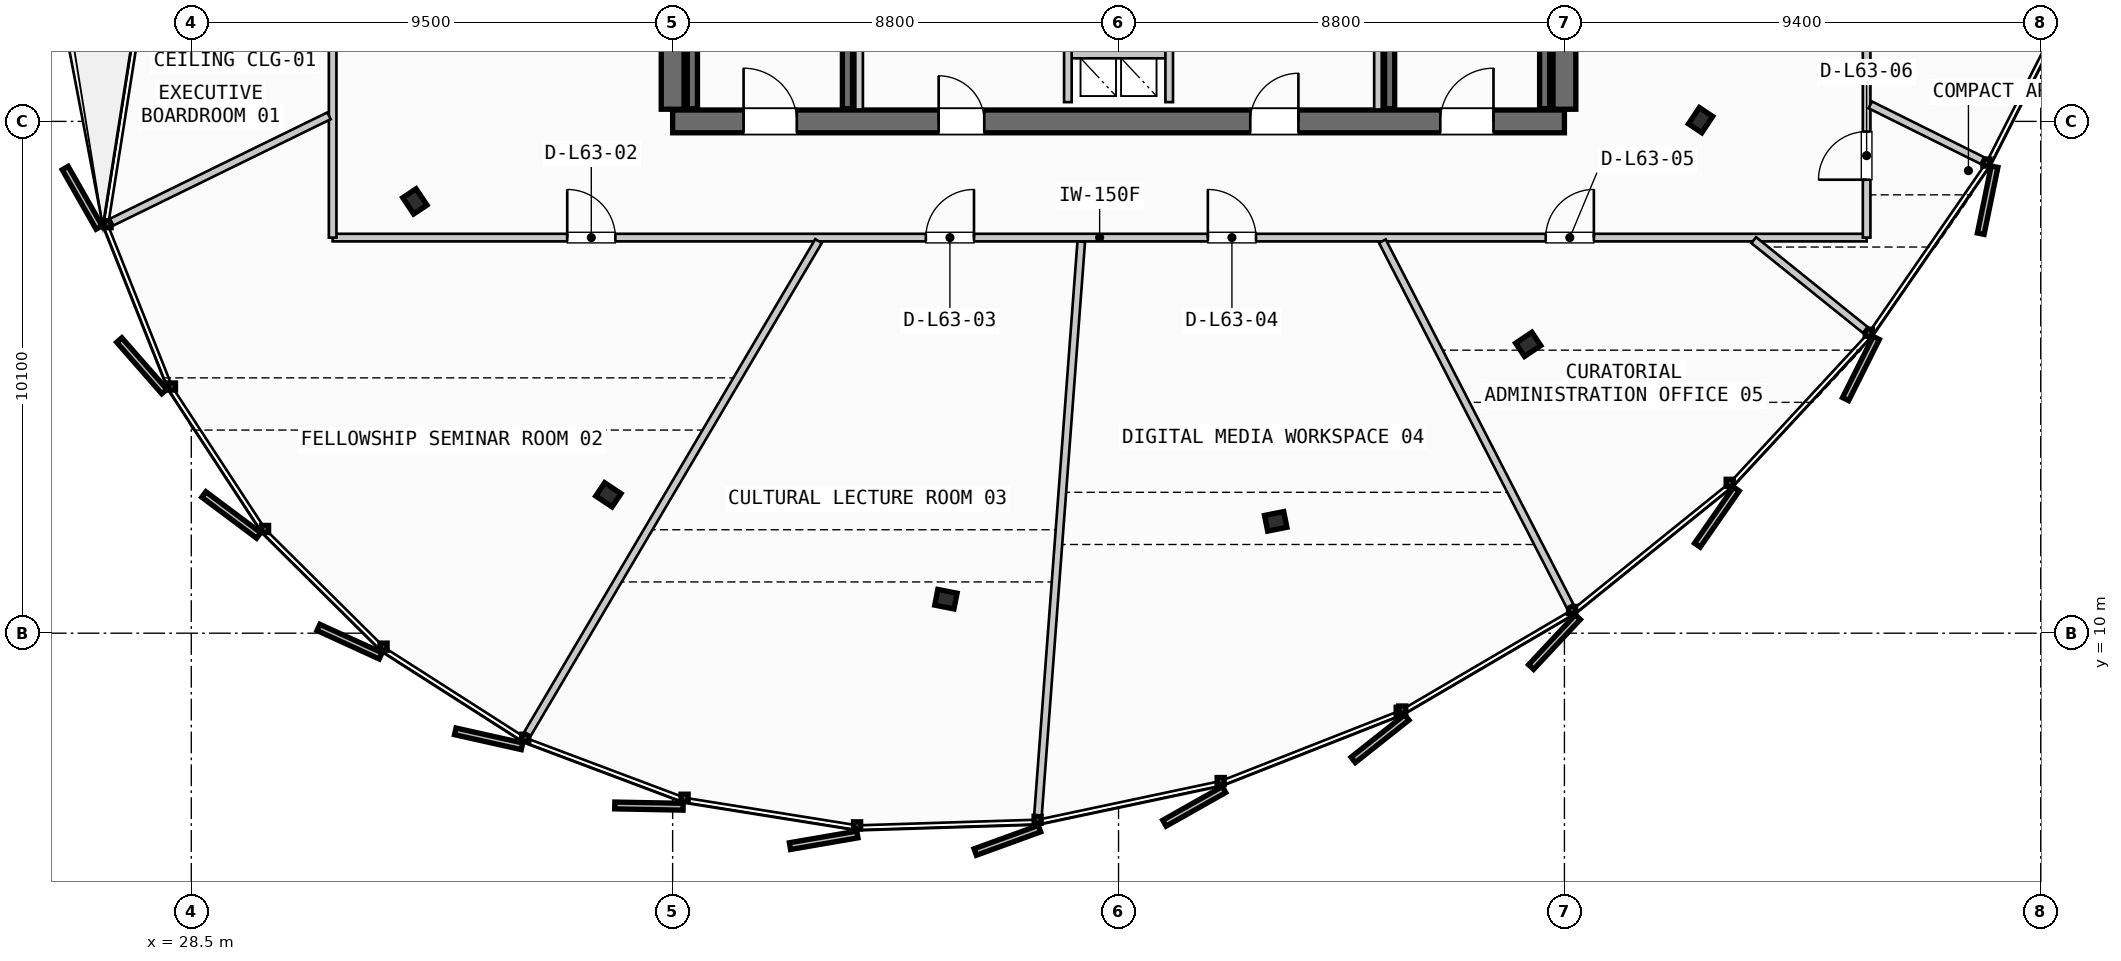
"""IFC4 building model, lengths in metres.
Left out: names, types, materials, properties, quantities, classifications, styles, units other than length and angle.
Written with IfcOpenShell. Run it as: python <this file> out.ifc"""

import sys

from ifc_helpers import new_model, si_unit, direction, frame, frame_2d, origin, origin_2d, place, context, subcontext, project, spatial, rectangle, i_section, extrude, source, transform, mapped, element, fill, save


model = new_model("IFC4")
c1 = context("Model", 3, precision=1e-05, world=origin(), true_north=direction((0.0, 1.0)))
c2 = subcontext(c1, "Body", "Model", "MODEL_VIEW")
j1 = project(units=[si_unit("LENGTHUNIT", "METRE"), si_unit("PLANEANGLEUNIT", "RADIAN")], contexts=[c1])
p1 = place(None, origin())
s1 = spatial("IfcSite", under=j1, at=p1, CompositionType="ELEMENT")
p2 = place(p1, origin())
s2 = spatial("IfcBuilding", under=s1, at=p2, CompositionType="ELEMENT")
p3 = place(p2, frame((0.0, 0.0, 242.2)))
s3 = spatial("IfcBuildingStorey", under=s2, at=p3, CompositionType="ELEMENT", Elevation=242.2)
p4 = place(p3, frame((38.0, 20.1, 0.0), z_axis=(0.0, 0.0, 1.0), x_axis=(1.0, 0.0, 0.0)))
e1 = element("IfcWall", 1, at=p4, inside=s3, PredefinedType="SHEAR", context=c2, shape_type="SweptSolid", body=[
    extrude(rectangle(XDim=17.6, YDim=0.45, at=frame_2d((8.8, 0.0))), origin(), (0.0, 0.0, 1.0), 3.21),
])
p5 = place(p4, frame((1.4, 0.0, 0.0)))
e2 = element("IfcOpeningElement", 2, at=p5, cuts=e1, PredefinedType="OPENING", context=c2, shape_type="SweptSolid", body=[
    extrude(rectangle(XDim=1.05, YDim=2.15, at=frame_2d((0.525, 1.075))), frame((0.0, 0.235, 0.0), z_axis=(0.0, -1.0, 0.0), x_axis=(1.0, 0.0, 0.0)), (0.0, 0.0, 1.0), 0.47),
])
p6 = place(p4, frame((15.15, 0.0, 0.0)))
e3 = element("IfcOpeningElement", 3, at=p6, cuts=e1, PredefinedType="OPENING", context=c2, shape_type="SweptSolid", body=[
    extrude(rectangle(XDim=1.05, YDim=2.15, at=frame_2d((0.525, 1.075))), frame((0.0, 0.235, 0.0), z_axis=(0.0, -1.0, 0.0), x_axis=(1.0, 0.0, 0.0)), (0.0, 0.0, 1.0), 0.47),
])
p7 = place(p4, frame((5.25, 0.0, 0.0)))
e4 = element("IfcOpeningElement", 4, at=p7, cuts=e1, PredefinedType="OPENING", context=c2, shape_type="SweptSolid", body=[
    extrude(rectangle(XDim=0.9, YDim=2.15, at=frame_2d((0.45, 1.075))), frame((0.0, 0.235, 0.0), z_axis=(0.0, -1.0, 0.0), x_axis=(1.0, 0.0, 0.0)), (0.0, 0.0, 1.0), 0.47),
])
p8 = place(p4, frame((11.4, 0.0, 0.0)))
e5 = element("IfcOpeningElement", 5, at=p8, cuts=e1, PredefinedType="OPENING", context=c2, shape_type="SweptSolid", body=[
    extrude(rectangle(XDim=0.95, YDim=2.15, at=frame_2d((0.475, 1.075))), frame((0.0, 0.235, 0.0), z_axis=(0.0, -1.0, 0.0), x_axis=(1.0, 0.0, 0.0)), (0.0, 0.0, 1.0), 0.47),
])
p9 = place(p3, frame((38.0, 35.26, 0.0), z_axis=(0.0, 0.0, 1.0), x_axis=(0.0, -1.0, 0.0)))
e6 = element("IfcWall", 6, at=p9, inside=s3, PredefinedType="SHEAR", context=c2, shape_type="SweptSolid", body=[
    extrude(rectangle(XDim=14.92, YDim=0.45, at=frame_2d((7.46, 0.0))), origin(), (0.0, 0.0, 1.0), 3.21),
])
p10 = place(p9, frame((5.21, 0.0, 0.0)))
e7 = element("IfcOpeningElement", 7, at=p10, cuts=e6, PredefinedType="OPENING", context=c2, shape_type="SweptSolid", body=[
    extrude(rectangle(XDim=1.1, YDim=2.2, at=frame_2d((0.55, 1.1))), frame((0.0, 0.235, 0.0), z_axis=(0.0, -1.0, 0.0), x_axis=(1.0, 0.0, 0.0)), (0.0, 0.0, 1.0), 0.47),
])
p11 = place(p3, frame((55.6, 20.34, 0.0), z_axis=(0.0, 0.0, 1.0), x_axis=(0.0, 1.0, 0.0)))
e8 = element("IfcWall", 8, at=p11, inside=s3, PredefinedType="SHEAR", context=c2, shape_type="SweptSolid", body=[
    extrude(rectangle(XDim=14.92, YDim=0.45, at=frame_2d((7.46, 0.0))), origin(), (0.0, 0.0, 1.0), 3.21),
])
p12 = place(p11, frame((12.71, 0.0, 0.0)))
e9 = element("IfcOpeningElement", 9, at=p12, cuts=e8, PredefinedType="OPENING", context=c2, shape_type="SweptSolid", body=[
    extrude(rectangle(XDim=1.05, YDim=2.15, at=frame_2d((0.525, 1.075))), frame((0.0, 0.235, 0.0), z_axis=(0.0, -1.0, 0.0), x_axis=(1.0, 0.0, 0.0)), (0.0, 0.0, 1.0), 0.47),
])
p13 = place(p11, frame((8.61, 0.0, 0.0)))
e10 = element("IfcOpeningElement", 10, at=p13, cuts=e8, PredefinedType="OPENING", context=c2, shape_type="SweptSolid", body=[
    extrude(rectangle(XDim=1.1, YDim=2.2, at=frame_2d((0.55, 1.1))), frame((0.0, 0.235, 0.0), z_axis=(0.0, -1.0, 0.0), x_axis=(1.0, 0.0, 0.0)), (0.0, 0.0, 1.0), 0.47),
])
m1 = source(origin(), c2, "Body", "SweptSolid", [
    extrude(i_section(OverallWidth=0.387, OverallDepth=0.316, WebThickness=0.019, FlangeThickness=0.028, FilletRadius=0.015, at=origin_2d()), origin(), (0.0, 0.0, 1.0), 3.21),
])
for number, where, z_axis, x_axis in (
    (11, (32.913, 18.521, 0.0), (0.0, 0.0, 1.0), (-0.831, -0.556, 0.0)),
    (12, (36.731, 12.731, 0.0), (0.0, 0.0, 1.0), (-0.556, -0.831, 0.0)),
    (13, (43.393, 10.671, 0.0), (0.0, 0.0, 1.0), (-0.195, -0.981, 0.0)),
    (14, (49.902, 12.207, 0.0), (0.0, 0.0, 1.0), (0.195, -0.981, 0.0)),
    (15, (54.885, 15.7, 0.0), (0.0, 0.0, 1.0), (0.556, -0.831, 0.0)),
    (16, (58.287, 20.125, 0.0), (0.0, 0.0, 1.0), (0.831, -0.556, 0.0)),
):
    element("IfcColumn", number, at=place(p3, frame(where, z_axis=z_axis, x_axis=x_axis)), inside=s3, PredefinedType="COLUMN", context=c2, shape_type="MappedRepresentation", body=[
        mapped(m1, transform((0.0, 0.0, 0.0), scale=1.0)),
    ])
for number, where, z_axis, x_axis in (
    (17, (41.45, 27.7, 0.0), (0.0, 0.0, 1.0), (0.0, -1.0, 0.0)),
    (18, (38.39, 20.35, 0.0), (0.0, 0.0, 1.0), (0.0, 1.0, 0.0)),
    (19, (55.21, 27.7, 0.0), (0.0, 0.0, 1.0), (0.0, -1.0, 0.0)),
    (20, (52.15, 20.35, 0.0), (0.0, 0.0, 1.0), (0.0, 1.0, 0.0)),
):
    element("IfcWall", number, at=place(p3, frame(where, z_axis=z_axis, x_axis=x_axis)), inside=s3, PredefinedType="SHEAR", context=c2, shape_type="SweptSolid", body=[
        extrude(rectangle(XDim=7.35, YDim=0.2, at=frame_2d((3.675, 0.0))), origin(), (0.0, 0.0, 1.0), 3.21),
    ])
p14 = place(p3, frame((45.8, 21.42, 0.0), z_axis=(0.0, 0.0, 1.0), x_axis=(1.0, 0.0, 0.0)))
e21 = element("IfcWall", 21, at=p14, inside=s3, PredefinedType="PARTITIONING", context=c2, shape_type="SweptSolid", body=[
    extrude(rectangle(XDim=2.0, YDim=0.15, at=frame_2d((1.0, 0.0))), origin(), (0.0, 0.0, 1.0), 2.28),
])
for number, where, z_axis, x_axis in (
    (22, (45.8, 20.48, 0.0), (0.0, 0.0, 1.0), (0.0, 1.0, 0.0)),
    (23, (47.8, 20.48, 0.0), (0.0, 0.0, 1.0), (0.0, 1.0, 0.0)),
):
    element("IfcWall", number, at=place(p3, frame(where, z_axis=z_axis, x_axis=x_axis)), inside=s3, PredefinedType="PARTITIONING", context=c2, shape_type="SweptSolid", body=[
        extrude(rectangle(XDim=2.24, YDim=0.15, at=frame_2d((1.12, 0.0))), origin(), (0.0, 0.0, 1.0), 2.28),
    ])
for number, where, z_axis, x_axis in (
    (24, (41.68, 20.335, 0.0), (0.0, 0.0, 1.0), (0.0, 1.0, 0.0)),
    (25, (51.92, 20.335, 0.0), (0.0, 0.0, 1.0), (0.0, 1.0, 0.0)),
):
    element("IfcWall", number, at=place(p3, frame(where, z_axis=z_axis, x_axis=x_axis)), inside=s3, PredefinedType="PARTITIONING", context=c2, shape_type="SweptSolid", body=[
        extrude(rectangle(XDim=2.395, YDim=0.15, at=frame_2d((1.198, 0.0))), origin(), (0.0, 0.0, 1.0), 2.28),
    ])
p15 = place(p3, frame((31.29, 17.807, 0.0), z_axis=(0.0, 0.0, 1.0), x_axis=(1.0, 0.0, 0.0)))
e26 = element("IfcWall", 26, at=p15, inside=s3, PredefinedType="PARTITIONING", context=c2, shape_type="SweptSolid", body=[
    extrude(rectangle(XDim=30.274, YDim=0.15, at=frame_2d((15.137, 0.0))), origin(), (0.0, 0.0, 1.0), 2.28),
])
p16 = place(p15, frame((4.63, 0.0, 0.0)))
e27 = element("IfcOpeningElement", 27, at=p16, cuts=e26, PredefinedType="OPENING", context=c2, shape_type="SweptSolid", body=[
    extrude(rectangle(XDim=0.95, YDim=2.15, at=frame_2d((0.475, 1.075))), frame((0.0, 0.085, 0.0), z_axis=(0.0, -1.0, 0.0), x_axis=(1.0, 0.0, 0.0)), (0.0, 0.0, 1.0), 0.17),
])
p17 = place(p15, frame((11.707, 0.0, 0.0)))
e28 = element("IfcOpeningElement", 28, at=p17, cuts=e26, PredefinedType="OPENING", context=c2, shape_type="SweptSolid", body=[
    extrude(rectangle(XDim=0.95, YDim=2.15, at=frame_2d((0.475, 1.075))), frame((0.0, 0.085, 0.0), z_axis=(0.0, -1.0, 0.0), x_axis=(1.0, 0.0, 0.0)), (0.0, 0.0, 1.0), 0.17),
])
p18 = place(p15, frame((17.273, 0.0, 0.0)))
e29 = element("IfcOpeningElement", 29, at=p18, cuts=e26, PredefinedType="OPENING", context=c2, shape_type="SweptSolid", body=[
    extrude(rectangle(XDim=0.95, YDim=2.15, at=frame_2d((0.475, 1.075))), frame((0.0, 0.085, 0.0), z_axis=(0.0, -1.0, 0.0), x_axis=(1.0, 0.0, 0.0)), (0.0, 0.0, 1.0), 0.17),
])
p19 = place(p15, frame((23.941, 0.0, 0.0)))
e30 = element("IfcOpeningElement", 30, at=p19, cuts=e26, PredefinedType="OPENING", context=c2, shape_type="SweptSolid", body=[
    extrude(rectangle(XDim=0.95, YDim=2.15, at=frame_2d((0.475, 1.075))), frame((0.0, 0.085, 0.0), z_axis=(0.0, -1.0, 0.0), x_axis=(1.0, 0.0, 0.0)), (0.0, 0.0, 1.0), 0.17),
])
p20 = place(p3, frame((61.564, 17.807, 0.0), z_axis=(0.0, 0.0, 1.0), x_axis=(0.0, 1.0, 0.0)))
e31 = element("IfcWall", 31, at=p20, inside=s3, PredefinedType="PARTITIONING", context=c2, shape_type="SweptSolid", body=[
    extrude(rectangle(XDim=19.986, YDim=0.15, at=frame_2d((9.993, 0.0))), origin(), (0.0, 0.0, 1.0), 2.28),
])
p21 = place(p20, frame((1.142, 0.0, 0.0)))
e32 = element("IfcOpeningElement", 32, at=p21, cuts=e31, PredefinedType="OPENING", context=c2, shape_type="SweptSolid", body=[
    extrude(rectangle(XDim=0.95, YDim=2.15, at=frame_2d((0.475, 1.075))), frame((0.0, 0.085, 0.0), z_axis=(0.0, -1.0, 0.0), x_axis=(1.0, 0.0, 0.0)), (0.0, 0.0, 1.0), 0.17),
])
p22 = place(p20, frame((8.436, 0.0, 0.0)))
e33 = element("IfcOpeningElement", 33, at=p22, cuts=e31, PredefinedType="OPENING", context=c2, shape_type="SweptSolid", body=[
    extrude(rectangle(XDim=0.95, YDim=2.15, at=frame_2d((0.475, 1.075))), frame((0.0, 0.085, 0.0), z_axis=(0.0, -1.0, 0.0), x_axis=(1.0, 0.0, 0.0)), (0.0, 0.0, 1.0), 0.17),
])
p23 = place(p20, frame((16.137, 0.0, 0.0)))
e34 = element("IfcOpeningElement", 34, at=p23, cuts=e31, PredefinedType="OPENING", context=c2, shape_type="SweptSolid", body=[
    extrude(rectangle(XDim=0.95, YDim=2.15, at=frame_2d((0.475, 1.075))), frame((0.0, 0.085, 0.0), z_axis=(0.0, -1.0, 0.0), x_axis=(1.0, 0.0, 0.0)), (0.0, 0.0, 1.0), 0.17),
])
p24 = place(p3, frame((31.29, 37.793, 0.0), z_axis=(0.0, 0.0, 1.0), x_axis=(0.0, -1.0, 0.0)))
e35 = element("IfcWall", 35, at=p24, inside=s3, PredefinedType="PARTITIONING", context=c2, shape_type="SweptSolid", body=[
    extrude(rectangle(XDim=19.986, YDim=0.15, at=frame_2d((9.993, 0.0))), origin(), (0.0, 0.0, 1.0), 2.28),
])
p25 = place(p24, frame((14.349, 0.0, 0.0)))
e36 = element("IfcOpeningElement", 36, at=p25, cuts=e35, PredefinedType="OPENING", context=c2, shape_type="SweptSolid", body=[
    extrude(rectangle(XDim=0.95, YDim=2.15, at=frame_2d((0.475, 1.075))), frame((0.0, 0.085, 0.0), z_axis=(0.0, -1.0, 0.0), x_axis=(1.0, 0.0, 0.0)), (0.0, 0.0, 1.0), 0.17),
])
p26 = place(p24, frame((8.228, 0.0, 0.0)))
e37 = element("IfcOpeningElement", 37, at=p26, cuts=e35, PredefinedType="OPENING", context=c2, shape_type="SweptSolid", body=[
    extrude(rectangle(XDim=0.95, YDim=2.15, at=frame_2d((0.475, 1.075))), frame((0.0, 0.085, 0.0), z_axis=(0.0, -1.0, 0.0), x_axis=(1.0, 0.0, 0.0)), (0.0, 0.0, 1.0), 0.17),
])
p27 = place(p3, frame((31.218, 20.21, 0.0), z_axis=(0.0, 0.0, 1.0), x_axis=(-0.898329656066, -0.439322010639, 0.0)))
e38 = element("IfcWall", 38, at=p27, inside=s3, PredefinedType="PARTITIONING", context=c2, shape_type="SweptSolid", body=[
    extrude(rectangle(XDim=4.775, YDim=0.15, at=frame_2d((2.387, 0.0))), origin(), (0.0, 0.0, 1.0), 2.28),
])
p28 = place(p3, frame((40.879, 17.738, 0.0), z_axis=(0.0, 0.0, 1.0), x_axis=(-0.508451772363, -0.861090468639, 0.0)))
e39 = element("IfcWall", 39, at=p28, inside=s3, PredefinedType="PARTITIONING", context=c2, shape_type="SweptSolid", body=[
    extrude(rectangle(XDim=11.292, YDim=0.15, at=frame_2d((5.646, 0.0))), origin(), (0.0, 0.0, 1.0), 2.28),
])
p29 = place(p3, frame((46.064, 17.727, 0.0), z_axis=(0.0, 0.0, 1.0), x_axis=(-0.075232652421, -0.99716600825, 0.0)))
e40 = element("IfcWall", 40, at=p29, inside=s3, PredefinedType="PARTITIONING", context=c2, shape_type="SweptSolid", body=[
    extrude(rectangle(XDim=11.352, YDim=0.15, at=frame_2d((5.676, 0.0))), origin(), (0.0, 0.0, 1.0), 2.28),
])
p30 = place(p3, frame((52.008, 17.736, 0.0), z_axis=(0.0, 0.0, 1.0), x_axis=(0.457414796782, -0.889253453007, 0.0)))
e41 = element("IfcWall", 41, at=p30, inside=s3, PredefinedType="PARTITIONING", context=c2, shape_type="SweptSolid", body=[
    extrude(rectangle(XDim=8.095, YDim=0.15, at=frame_2d((4.047, 0.0))), origin(), (0.0, 0.0, 1.0), 2.28),
])
p31 = place(p3, frame((59.336, 17.757, 0.0), z_axis=(0.0, 0.0, 1.0), x_axis=(0.778950927575, -0.627084884549, 0.0)))
e42 = element("IfcWall", 42, at=p31, inside=s3, PredefinedType="PARTITIONING", context=c2, shape_type="SweptSolid", body=[
    extrude(rectangle(XDim=2.824, YDim=0.15, at=frame_2d((1.412, 0.0))), origin(), (0.0, 0.0, 1.0), 2.28),
])
p32 = place(p3, frame((61.635, 20.426, 0.0), z_axis=(0.0, 0.0, 1.0), x_axis=(0.895649664902, -0.444760247505, 0.0)))
e43 = element("IfcWall", 43, at=p32, inside=s3, PredefinedType="PARTITIONING", context=c2, shape_type="SweptSolid", body=[
    extrude(rectangle(XDim=2.47, YDim=0.15, at=frame_2d((1.235, 0.0))), origin(), (0.0, 0.0, 1.0), 2.28),
])
m2 = source(origin(), c2, "Body", "SweptSolid", [
    extrude(rectangle(XDim=1.05, YDim=2.15, at=frame_2d((0.525, 1.075))), frame((0.0, 0.025, 0.0), z_axis=(0.0, -1.0, 0.0), x_axis=(1.0, 0.0, 0.0)), (0.0, 0.0, 1.0), 0.05),
])
p33 = place(p5, origin())
e44 = element("IfcDoor", 44, at=p33, inside=s3, OperationType="SINGLE_SWING_LEFT", PredefinedType="DOOR", context=c2, shape_type="MappedRepresentation", body=[
    mapped(m2, transform((0.0, 0.0, 0.0), scale=1.0)),
])
fill(e2, e44)
p34 = place(p6, origin())
e45 = element("IfcDoor", 45, at=p34, inside=s3, OperationType="SINGLE_SWING_RIGHT", PredefinedType="DOOR", context=c2, shape_type="MappedRepresentation", body=[
    mapped(m2, transform((0.0, 0.0, 0.0), scale=1.0)),
])
fill(e3, e45)
m3 = source(origin(), c2, "Body", "SweptSolid", [
    extrude(rectangle(XDim=0.9, YDim=2.15, at=frame_2d((0.45, 1.075))), frame((0.0, 0.025, 0.0), z_axis=(0.0, -1.0, 0.0), x_axis=(1.0, 0.0, 0.0)), (0.0, 0.0, 1.0), 0.05),
])
p35 = place(p7, origin())
e46 = element("IfcDoor", 46, at=p35, inside=s3, OperationType="SINGLE_SWING_LEFT", PredefinedType="DOOR", context=c2, shape_type="MappedRepresentation", body=[
    mapped(m3, transform((0.0, 0.0, 0.0), scale=1.0)),
])
fill(e4, e46)
m4 = source(origin(), c2, "Body", "SweptSolid", [
    extrude(rectangle(XDim=0.95, YDim=2.15, at=frame_2d((0.475, 1.075))), frame((0.0, 0.025, 0.0), z_axis=(0.0, -1.0, 0.0), x_axis=(1.0, 0.0, 0.0)), (0.0, 0.0, 1.0), 0.05),
])
p36 = place(p8, origin())
e47 = element("IfcDoor", 47, at=p36, inside=s3, OperationType="SINGLE_SWING_RIGHT", PredefinedType="DOOR", context=c2, shape_type="MappedRepresentation", body=[
    mapped(m4, transform((0.0, 0.0, 0.0), scale=1.0)),
])
fill(e5, e47)
p37 = place(p16, origin())
e48 = element("IfcDoor", 48, at=p37, inside=s3, OperationType="SINGLE_SWING_LEFT", PredefinedType="DOOR", context=c2, shape_type="MappedRepresentation", body=[
    mapped(m4, transform((0.0, 0.0, 0.0), scale=1.0)),
])
fill(e27, e48)
p38 = place(p17, origin())
e49 = element("IfcDoor", 49, at=p38, inside=s3, OperationType="SINGLE_SWING_RIGHT", PredefinedType="DOOR", context=c2, shape_type="MappedRepresentation", body=[
    mapped(m4, transform((0.0, 0.0, 0.0), scale=1.0)),
])
fill(e28, e49)
p39 = place(p18, origin())
e50 = element("IfcDoor", 50, at=p39, inside=s3, OperationType="SINGLE_SWING_LEFT", PredefinedType="DOOR", context=c2, shape_type="MappedRepresentation", body=[
    mapped(m4, transform((0.0, 0.0, 0.0), scale=1.0)),
])
fill(e29, e50)
p40 = place(p19, origin())
e51 = element("IfcDoor", 51, at=p40, inside=s3, OperationType="SINGLE_SWING_RIGHT", PredefinedType="DOOR", context=c2, shape_type="MappedRepresentation", body=[
    mapped(m4, transform((0.0, 0.0, 0.0), scale=1.0)),
])
fill(e30, e51)
p41 = place(p21, origin())
e52 = element("IfcDoor", 52, at=p41, inside=s3, OperationType="SINGLE_SWING_LEFT", PredefinedType="DOOR", context=c2, shape_type="MappedRepresentation", body=[
    mapped(m4, transform((0.0, 0.0, 0.0), scale=1.0)),
])
fill(e32, e52)
save(model, sys.argv[1])
